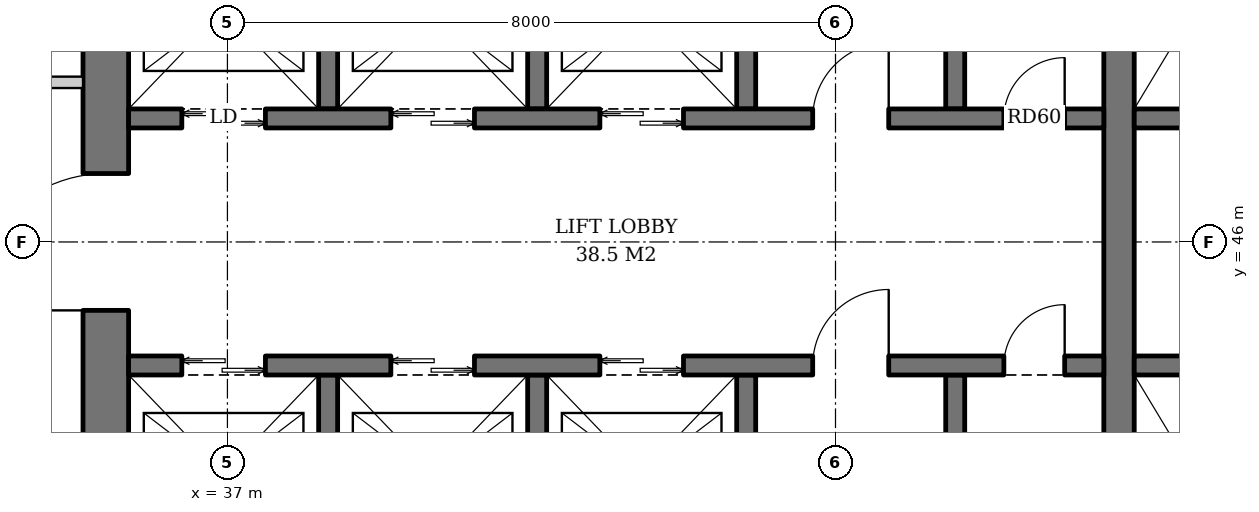
"""IFC4 building model, lengths in metres.
Left out: names, types, materials, properties, quantities, classifications, styles, units other than length and angle.
Written with IfcOpenShell. Run it as: python <this file> out.ifc"""

import sys

from ifc_helpers import new_model, si_unit, direction, frame, frame_2d, origin, place, context, subcontext, project, spatial, rectangle, extrude, element, fill, save


model = new_model("IFC4")
c1 = context("Model", 3, precision=1e-05, world=origin(), true_north=direction((0.0, 1.0)))
c2 = subcontext(c1, "Body", "Model", "MODEL_VIEW")
j1 = project(units=[si_unit("LENGTHUNIT", "METRE"), si_unit("PLANEANGLEUNIT", "RADIAN")], contexts=[c1])
p1 = place(None, origin())
s1 = spatial("IfcSite", under=j1, at=p1, CompositionType="ELEMENT")
p2 = place(p1, origin())
s2 = spatial("IfcBuilding", under=s1, at=p2, CompositionType="ELEMENT")
p3 = place(p2, frame((0.0, 0.0, 218.6)))
s3 = spatial("IfcBuildingStorey", under=s2, at=p3, CompositionType="ELEMENT", Elevation=218.6)
p4 = place(p3, frame((35.4, 36.7, 0.0), z_axis=(0.0, 0.0, 1.0), x_axis=(0.0, 1.0, 0.0)))
e1 = element("IfcWall", 1, at=p4, inside=s3, PredefinedType="SHEAR", context=c2, shape_type="SweptSolid", body=[
    extrude(rectangle(XDim=18.6, YDim=0.6, at=frame_2d((9.3, 0.0))), origin(), (0.0, 0.0, 1.0), 3.8),
])
p5 = place(p4, frame((8.4, 0.0, 0.0)))
e2 = element("IfcOpeningElement", 2, at=p5, cuts=e1, PredefinedType="OPENING", context=c2, shape_type="SweptSolid", body=[
    extrude(rectangle(XDim=1.8, YDim=2.4, at=frame_2d((0.9, 1.2))), frame((0.0, 0.31, 0.0), z_axis=(0.0, -1.0, 0.0), x_axis=(1.0, 0.0, 0.0)), (0.0, 0.0, 1.0), 0.62),
])
p6 = place(p3, frame((48.73, 40.0, 0.0), z_axis=(0.0, 0.0, 1.0), x_axis=(0.0, 1.0, 0.0)))
e3 = element("IfcWall", 3, at=p6, inside=s3, PredefinedType="SHEAR", context=c2, shape_type="SweptSolid", body=[
    extrude(rectangle(XDim=12.0, YDim=0.4, at=frame_2d((6.0, 0.0))), origin(), (0.0, 0.0, 1.0), 3.8),
])
for number, where, z_axis, x_axis in (
    (4, (38.325, 47.75, 0.0), (0.0, 0.0, 1.0), (0.0, 1.0, 0.0)),
    (5, (41.075, 47.75, 0.0), (0.0, 0.0, 1.0), (0.0, 1.0, 0.0)),
    (6, (43.825, 47.75, 0.0), (0.0, 0.0, 1.0), (0.0, 1.0, 0.0)),
    (7, (46.575, 47.75, 0.0), (0.0, 0.0, 1.0), (0.0, 1.0, 0.0)),
):
    element("IfcWall", number, at=place(p3, frame(where, z_axis=z_axis, x_axis=x_axis)), inside=s3, PredefinedType="SHEAR", context=c2, shape_type="SweptSolid", body=[
        extrude(rectangle(XDim=2.6, YDim=0.25, at=frame_2d((1.3, 0.0))), origin(), (0.0, 0.0, 1.0), 3.8),
    ])
p7 = place(p3, frame((35.7, 47.625, 0.0), z_axis=(0.0, 0.0, 1.0), x_axis=(1.0, 0.0, 0.0)))
e8 = element("IfcWall", 8, at=p7, inside=s3, PredefinedType="SHEAR", context=c2, shape_type="SweptSolid", body=[
    extrude(rectangle(XDim=12.83, YDim=0.25, at=frame_2d((6.415, 0.0))), origin(), (0.0, 0.0, 1.0), 3.8),
])
p8 = place(p7, frame((0.7, 0.0, 0.0)))
e9 = element("IfcOpeningElement", 9, at=p8, cuts=e8, PredefinedType="OPENING", context=c2, shape_type="SweptSolid", body=[
    extrude(rectangle(XDim=1.1, YDim=2.2, at=frame_2d((0.55, 1.1))), frame((0.0, 0.135, 0.0), z_axis=(0.0, -1.0, 0.0), x_axis=(1.0, 0.0, 0.0)), (0.0, 0.0, 1.0), 0.27),
])
p9 = place(p7, frame((3.45, 0.0, 0.0)))
e10 = element("IfcOpeningElement", 10, at=p9, cuts=e8, PredefinedType="OPENING", context=c2, shape_type="SweptSolid", body=[
    extrude(rectangle(XDim=1.1, YDim=2.2, at=frame_2d((0.55, 1.1))), frame((0.0, 0.135, 0.0), z_axis=(0.0, -1.0, 0.0), x_axis=(1.0, 0.0, 0.0)), (0.0, 0.0, 1.0), 0.27),
])
p10 = place(p7, frame((6.2, 0.0, 0.0)))
e11 = element("IfcOpeningElement", 11, at=p10, cuts=e8, PredefinedType="OPENING", context=c2, shape_type="SweptSolid", body=[
    extrude(rectangle(XDim=1.1, YDim=2.2, at=frame_2d((0.55, 1.1))), frame((0.0, 0.135, 0.0), z_axis=(0.0, -1.0, 0.0), x_axis=(1.0, 0.0, 0.0)), (0.0, 0.0, 1.0), 0.27),
])
p11 = place(p7, frame((9.0, 0.0, 0.0)))
e12 = element("IfcOpeningElement", 12, at=p11, cuts=e8, PredefinedType="OPENING", context=c2, shape_type="SweptSolid", body=[
    extrude(rectangle(XDim=1.0, YDim=2.1, at=frame_2d((0.5, 1.05))), frame((0.0, 0.135, 0.0), z_axis=(0.0, -1.0, 0.0), x_axis=(1.0, 0.0, 0.0)), (0.0, 0.0, 1.0), 0.27),
])
p12 = place(p7, frame((11.515, 0.0, 0.0)))
e13 = element("IfcOpeningElement", 13, at=p12, cuts=e8, PredefinedType="OPENING", context=c2, shape_type="SweptSolid", body=[
    extrude(rectangle(XDim=0.8, YDim=2.0, at=frame_2d((0.4, 1.0))), frame((0.0, 0.135, 0.0), z_axis=(0.0, -1.0, 0.0), x_axis=(1.0, 0.0, 0.0)), (0.0, 0.0, 1.0), 0.27),
])
for number, where, z_axis, x_axis in (
    (14, (38.325, 44.25, 0.0), (0.0, 0.0, 1.0), (0.0, -1.0, 0.0)),
    (15, (41.075, 44.25, 0.0), (0.0, 0.0, 1.0), (0.0, -1.0, 0.0)),
    (16, (43.825, 44.25, 0.0), (0.0, 0.0, 1.0), (0.0, -1.0, 0.0)),
    (17, (46.575, 44.25, 0.0), (0.0, 0.0, 1.0), (0.0, -1.0, 0.0)),
):
    element("IfcWall", number, at=place(p3, frame(where, z_axis=z_axis, x_axis=x_axis)), inside=s3, PredefinedType="SHEAR", context=c2, shape_type="SweptSolid", body=[
        extrude(rectangle(XDim=2.6, YDim=0.25, at=frame_2d((1.3, 0.0))), origin(), (0.0, 0.0, 1.0), 3.8),
    ])
p13 = place(p3, frame((35.7, 44.375, 0.0), z_axis=(0.0, 0.0, 1.0), x_axis=(1.0, 0.0, 0.0)))
e18 = element("IfcWall", 18, at=p13, inside=s3, PredefinedType="SHEAR", context=c2, shape_type="SweptSolid", body=[
    extrude(rectangle(XDim=12.83, YDim=0.25, at=frame_2d((6.415, 0.0))), origin(), (0.0, 0.0, 1.0), 3.8),
])
p14 = place(p13, frame((0.7, 0.0, 0.0)))
e19 = element("IfcOpeningElement", 19, at=p14, cuts=e18, PredefinedType="OPENING", context=c2, shape_type="SweptSolid", body=[
    extrude(rectangle(XDim=1.1, YDim=2.2, at=frame_2d((0.55, 1.1))), frame((0.0, 0.135, 0.0), z_axis=(0.0, -1.0, 0.0), x_axis=(1.0, 0.0, 0.0)), (0.0, 0.0, 1.0), 0.27),
])
p15 = place(p13, frame((3.45, 0.0, 0.0)))
e20 = element("IfcOpeningElement", 20, at=p15, cuts=e18, PredefinedType="OPENING", context=c2, shape_type="SweptSolid", body=[
    extrude(rectangle(XDim=1.1, YDim=2.2, at=frame_2d((0.55, 1.1))), frame((0.0, 0.135, 0.0), z_axis=(0.0, -1.0, 0.0), x_axis=(1.0, 0.0, 0.0)), (0.0, 0.0, 1.0), 0.27),
])
p16 = place(p13, frame((6.2, 0.0, 0.0)))
e21 = element("IfcOpeningElement", 21, at=p16, cuts=e18, PredefinedType="OPENING", context=c2, shape_type="SweptSolid", body=[
    extrude(rectangle(XDim=1.1, YDim=2.2, at=frame_2d((0.55, 1.1))), frame((0.0, 0.135, 0.0), z_axis=(0.0, -1.0, 0.0), x_axis=(1.0, 0.0, 0.0)), (0.0, 0.0, 1.0), 0.27),
])
p17 = place(p13, frame((9.0, 0.0, 0.0)))
e22 = element("IfcOpeningElement", 22, at=p17, cuts=e18, PredefinedType="OPENING", context=c2, shape_type="SweptSolid", body=[
    extrude(rectangle(XDim=1.0, YDim=2.1, at=frame_2d((0.5, 1.05))), frame((0.0, 0.135, 0.0), z_axis=(0.0, -1.0, 0.0), x_axis=(1.0, 0.0, 0.0)), (0.0, 0.0, 1.0), 0.27),
])
p18 = place(p13, frame((11.515, 0.0, 0.0)))
e23 = element("IfcOpeningElement", 23, at=p18, cuts=e18, PredefinedType="OPENING", context=c2, shape_type="SweptSolid", body=[
    extrude(rectangle(XDim=0.8, YDim=2.0, at=frame_2d((0.4, 1.0))), frame((0.0, 0.135, 0.0), z_axis=(0.0, -1.0, 0.0), x_axis=(1.0, 0.0, 0.0)), (0.0, 0.0, 1.0), 0.27),
])
for number, where, z_axis, x_axis in (
    (24, (48.93, 47.625, 0.0), (0.0, 0.0, 1.0), (1.0, 0.0, 0.0)),
    (25, (48.93, 44.375, 0.0), (0.0, 0.0, 1.0), (1.0, 0.0, 0.0)),
):
    element("IfcWall", number, at=place(p3, frame(where, z_axis=z_axis, x_axis=x_axis)), inside=s3, PredefinedType="SHEAR", context=c2, shape_type="SweptSolid", body=[
        extrude(rectangle(XDim=5.37, YDim=0.25, at=frame_2d((2.685, 0.0))), origin(), (0.0, 0.0, 1.0), 3.8),
    ])
p19 = place(p3, frame((35.1, 48.1, 0.0), z_axis=(0.0, 0.0, 1.0), x_axis=(-1.0, 0.0, 0.0)))
e26 = element("IfcWall", 26, at=p19, inside=s3, PredefinedType="PARTITIONING", context=c2, shape_type="SweptSolid", body=[
    extrude(rectangle(XDim=1.725, YDim=0.15, at=frame_2d((0.863, 0.0))), origin(), (0.0, 0.0, 1.0), 3.62),
])
p20 = place(p8, origin())
e27 = element("IfcDoor", 27, at=p20, inside=s3, OperationType="DOUBLE_DOOR_SLIDING", PredefinedType="DOOR", context=c2, shape_type="SweptSolid", body=[
    extrude(rectangle(XDim=1.1, YDim=2.2, at=frame_2d((0.55, 1.1))), frame((0.0, 0.025, 0.0), z_axis=(0.0, -1.0, 0.0), x_axis=(1.0, 0.0, 0.0)), (0.0, 0.0, 1.0), 0.05),
])
fill(e9, e27)
p21 = place(p9, origin())
e28 = element("IfcDoor", 28, at=p21, inside=s3, OperationType="DOUBLE_DOOR_SLIDING", PredefinedType="DOOR", context=c2, shape_type="SweptSolid", body=[
    extrude(rectangle(XDim=1.1, YDim=2.2, at=frame_2d((0.55, 1.1))), frame((0.0, 0.025, 0.0), z_axis=(0.0, -1.0, 0.0), x_axis=(1.0, 0.0, 0.0)), (0.0, 0.0, 1.0), 0.05),
])
fill(e10, e28)
p22 = place(p10, origin())
e29 = element("IfcDoor", 29, at=p22, inside=s3, OperationType="DOUBLE_DOOR_SLIDING", PredefinedType="DOOR", context=c2, shape_type="SweptSolid", body=[
    extrude(rectangle(XDim=1.1, YDim=2.2, at=frame_2d((0.55, 1.1))), frame((0.0, 0.025, 0.0), z_axis=(0.0, -1.0, 0.0), x_axis=(1.0, 0.0, 0.0)), (0.0, 0.0, 1.0), 0.05),
])
fill(e11, e29)
p23 = place(p11, origin())
e30 = element("IfcDoor", 30, at=p23, inside=s3, OperationType="SINGLE_SWING_RIGHT", PredefinedType="DOOR", context=c2, shape_type="SweptSolid", body=[
    extrude(rectangle(XDim=1.0, YDim=2.1, at=frame_2d((0.5, 1.05))), frame((0.0, 0.025, 0.0), z_axis=(0.0, -1.0, 0.0), x_axis=(1.0, 0.0, 0.0)), (0.0, 0.0, 1.0), 0.05),
])
fill(e12, e30)
p24 = place(p12, origin())
e31 = element("IfcDoor", 31, at=p24, inside=s3, OperationType="SINGLE_SWING_RIGHT", PredefinedType="DOOR", context=c2, shape_type="SweptSolid", body=[
    extrude(rectangle(XDim=0.8, YDim=2.0, at=frame_2d((0.4, 1.0))), frame((0.0, 0.025, 0.0), z_axis=(0.0, -1.0, 0.0), x_axis=(1.0, 0.0, 0.0)), (0.0, 0.0, 1.0), 0.05),
])
fill(e13, e31)
p25 = place(p14, origin())
e32 = element("IfcDoor", 32, at=p25, inside=s3, OperationType="DOUBLE_DOOR_SLIDING", PredefinedType="DOOR", context=c2, shape_type="SweptSolid", body=[
    extrude(rectangle(XDim=1.1, YDim=2.2, at=frame_2d((0.55, 1.1))), frame((0.0, 0.025, 0.0), z_axis=(0.0, -1.0, 0.0), x_axis=(1.0, 0.0, 0.0)), (0.0, 0.0, 1.0), 0.05),
])
fill(e19, e32)
p26 = place(p15, origin())
e33 = element("IfcDoor", 33, at=p26, inside=s3, OperationType="DOUBLE_DOOR_SLIDING", PredefinedType="DOOR", context=c2, shape_type="SweptSolid", body=[
    extrude(rectangle(XDim=1.1, YDim=2.2, at=frame_2d((0.55, 1.1))), frame((0.0, 0.025, 0.0), z_axis=(0.0, -1.0, 0.0), x_axis=(1.0, 0.0, 0.0)), (0.0, 0.0, 1.0), 0.05),
])
fill(e20, e33)
p27 = place(p16, origin())
e34 = element("IfcDoor", 34, at=p27, inside=s3, OperationType="DOUBLE_DOOR_SLIDING", PredefinedType="DOOR", context=c2, shape_type="SweptSolid", body=[
    extrude(rectangle(XDim=1.1, YDim=2.2, at=frame_2d((0.55, 1.1))), frame((0.0, 0.025, 0.0), z_axis=(0.0, -1.0, 0.0), x_axis=(1.0, 0.0, 0.0)), (0.0, 0.0, 1.0), 0.05),
])
fill(e21, e34)
p28 = place(p17, origin())
e35 = element("IfcDoor", 35, at=p28, inside=s3, OperationType="SINGLE_SWING_RIGHT", PredefinedType="DOOR", context=c2, shape_type="SweptSolid", body=[
    extrude(rectangle(XDim=1.0, YDim=2.1, at=frame_2d((0.5, 1.05))), frame((0.0, 0.025, 0.0), z_axis=(0.0, -1.0, 0.0), x_axis=(1.0, 0.0, 0.0)), (0.0, 0.0, 1.0), 0.05),
])
fill(e22, e35)
p29 = place(p18, origin())
e36 = element("IfcDoor", 36, at=p29, inside=s3, OperationType="SINGLE_SWING_RIGHT", PredefinedType="DOOR", context=c2, shape_type="SweptSolid", body=[
    extrude(rectangle(XDim=0.8, YDim=2.0, at=frame_2d((0.4, 1.0))), frame((0.0, 0.025, 0.0), z_axis=(0.0, -1.0, 0.0), x_axis=(1.0, 0.0, 0.0)), (0.0, 0.0, 1.0), 0.05),
])
fill(e23, e36)
p30 = place(p5, origin())
e37 = element("IfcDoor", 37, at=p30, inside=s3, OperationType="DOUBLE_DOOR_SINGLE_SWING", PredefinedType="DOOR", context=c2, shape_type="SweptSolid", body=[
    extrude(rectangle(XDim=1.8, YDim=2.4, at=frame_2d((0.9, 1.2))), frame((0.0, 0.025, 0.0), z_axis=(0.0, -1.0, 0.0), x_axis=(1.0, 0.0, 0.0)), (0.0, 0.0, 1.0), 0.05),
])
fill(e2, e37)
save(model, sys.argv[1])
